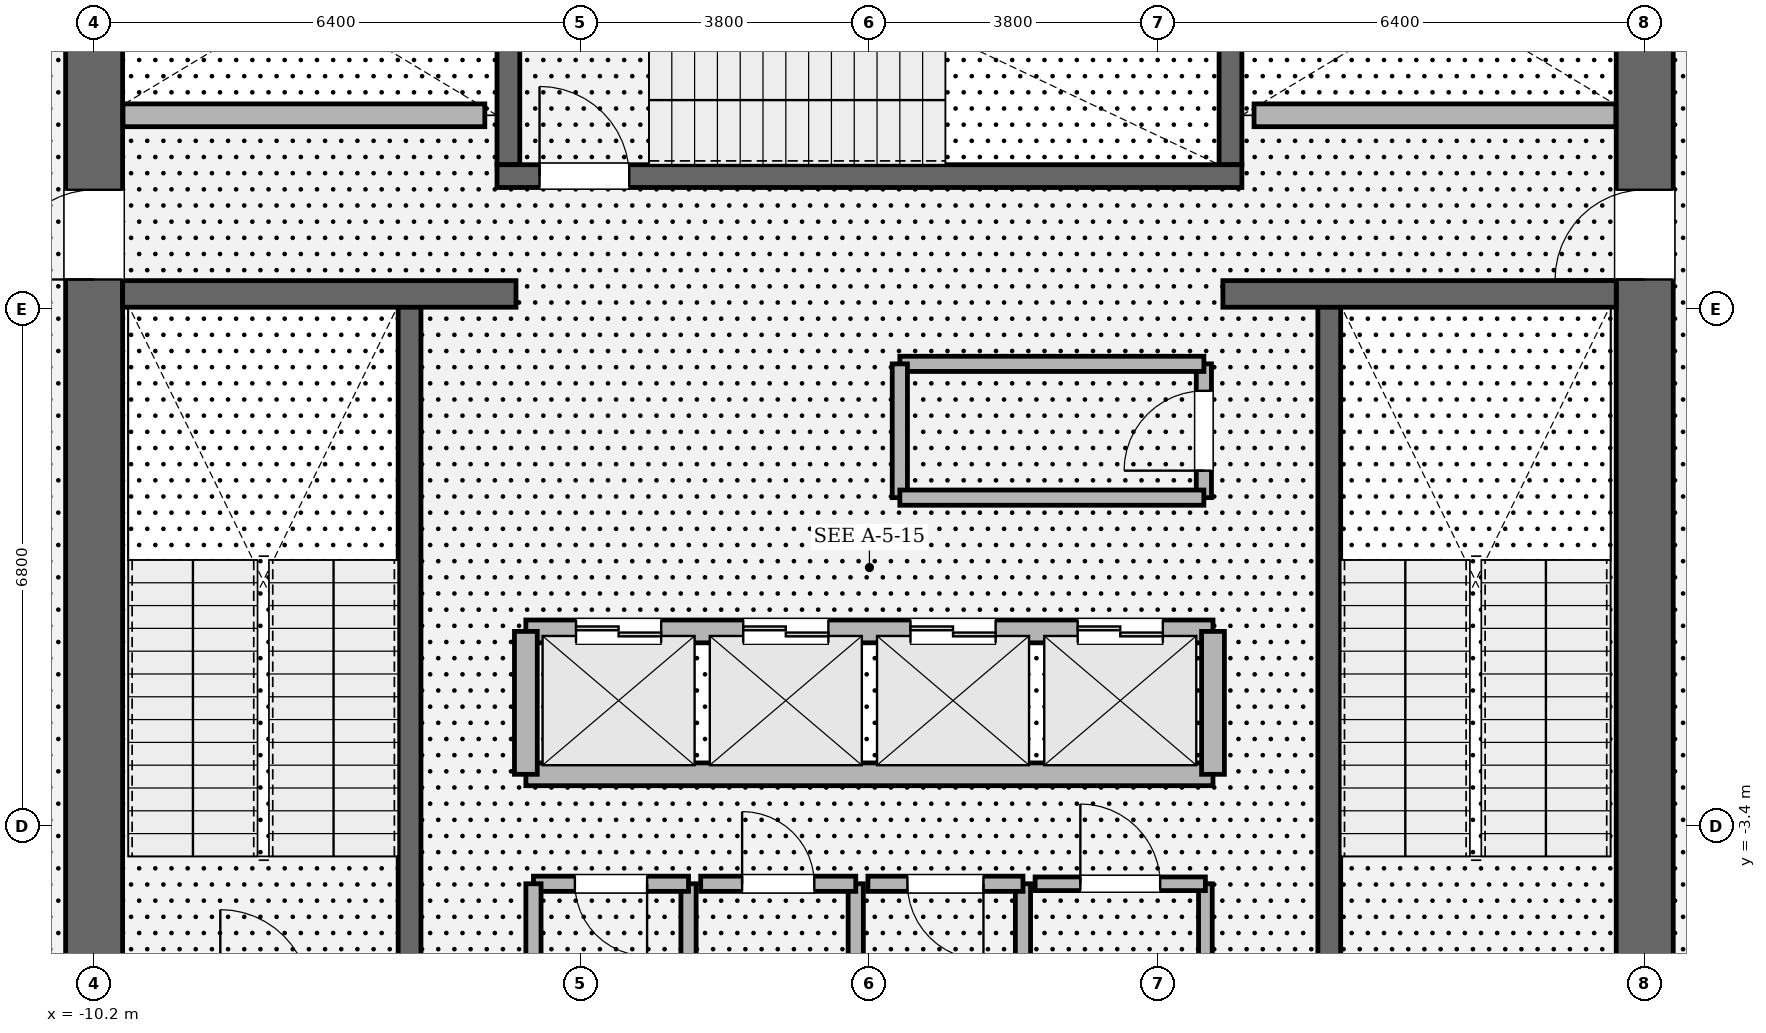
"""IFC4 building model, lengths in metres.
Left out: names, types, materials, properties, quantities, classifications, styles, units other than length and angle.
Written with IfcOpenShell. Run it as: python <this file> out.ifc"""

import sys

from ifc_helpers import new_model, si_unit, direction, frame, frame_2d, origin, place, context, subcontext, project, spatial, rectangle, extrude, element, fill, save


model = new_model("IFC4")
c1 = context("Model", 3, precision=1e-05, world=origin(), true_north=direction((0.0, 1.0)))
c2 = subcontext(c1, "Body", "Model", "MODEL_VIEW")
j1 = project(units=[si_unit("LENGTHUNIT", "METRE"), si_unit("PLANEANGLEUNIT", "RADIAN")], contexts=[c1])
p1 = place(None, origin())
s1 = spatial("IfcSite", under=j1, at=p1, CompositionType="ELEMENT")
p2 = place(p1, origin())
s2 = spatial("IfcBuilding", under=s1, at=p2, CompositionType="ELEMENT")
p3 = place(p2, frame((0.0, 0.0, 64.65)))
s3 = spatial("IfcBuildingStorey", under=s2, at=p3, CompositionType="ELEMENT", Elevation=64.65)
p4 = place(p3, frame((-10.2, -8.825, 0.0), z_axis=(0.0, 0.0, 1.0), x_axis=(0.0, 1.0, 0.0)))
e1 = element("IfcWall", 1, at=p4, inside=s3, PredefinedType="SHEAR", context=c2, shape_type="SweptSolid", body=[
    extrude(rectangle(XDim=17.65, YDim=0.75, at=frame_2d((8.825, 0.0))), origin(), (0.0, 0.0, 1.0), 4.05),
])
p5 = place(p4, frame((12.615, 0.0, 0.0)))
e2 = element("IfcOpeningElement", 2, at=p5, cuts=e1, PredefinedType="OPENING", context=c2, shape_type="SweptSolid", body=[
    extrude(rectangle(XDim=1.18, YDim=2.2, at=frame_2d((0.59, 1.1))), frame((0.0, 0.385, 0.0), z_axis=(0.0, -1.0, 0.0), x_axis=(1.0, 0.0, 0.0)), (0.0, 0.0, 1.0), 0.77),
])
p6 = place(p3, frame((10.2, 8.825, 0.0), z_axis=(0.0, 0.0, 1.0), x_axis=(0.0, -1.0, 0.0)))
e3 = element("IfcWall", 3, at=p6, inside=s3, PredefinedType="SHEAR", context=c2, shape_type="SweptSolid", body=[
    extrude(rectangle(XDim=17.65, YDim=0.75, at=frame_2d((8.825, 0.0))), origin(), (0.0, 0.0, 1.0), 4.05),
])
p7 = place(p6, frame((3.855, 0.0, 0.0)))
e4 = element("IfcOpeningElement", 4, at=p7, cuts=e3, PredefinedType="OPENING", context=c2, shape_type="SweptSolid", body=[
    extrude(rectangle(XDim=1.18, YDim=2.2, at=frame_2d((0.59, 1.1))), frame((0.0, 0.385, 0.0), z_axis=(0.0, -1.0, 0.0), x_axis=(1.0, 0.0, 0.0)), (0.0, 0.0, 1.0), 0.77),
])
for number, where, z_axis, x_axis in (
    (5, (-6.05, -5.5, 0.0), (0.0, 0.0, 1.0), (0.0, 1.0, 0.0)),
    (6, (6.05, 3.45, 0.0), (0.0, 0.0, 1.0), (0.0, -1.0, 0.0)),
):
    element("IfcWall", number, at=place(p3, frame(where, z_axis=z_axis, x_axis=x_axis)), inside=s3, PredefinedType="SOLIDWALL", context=c2, shape_type="SweptSolid", body=[
        extrude(rectangle(XDim=8.95, YDim=0.3, at=frame_2d((4.475, 0.0))), origin(), (0.0, 0.0, 1.0), 4.05),
    ])
for number, where, z_axis, x_axis in (
    (7, (-4.75, 5.3, 0.0), (0.0, 0.0, 1.0), (0.0, 1.0, 0.0)),
    (8, (4.75, 8.825, 0.0), (0.0, 0.0, 1.0), (0.0, -1.0, 0.0)),
):
    element("IfcWall", number, at=place(p3, frame(where, z_axis=z_axis, x_axis=x_axis)), inside=s3, PredefinedType="SOLIDWALL", context=c2, shape_type="SweptSolid", body=[
        extrude(rectangle(XDim=3.525, YDim=0.3, at=frame_2d((1.762, 0.0))), origin(), (0.0, 0.0, 1.0), 4.05),
    ])
p8 = place(p3, frame((-4.9, 5.15, 0.0), z_axis=(0.0, 0.0, 1.0), x_axis=(1.0, 0.0, 0.0)))
e9 = element("IfcWall", 9, at=p8, inside=s3, PredefinedType="SOLIDWALL", context=c2, shape_type="SweptSolid", body=[
    extrude(rectangle(XDim=9.8, YDim=0.3, at=frame_2d((4.9, 0.0))), origin(), (0.0, 0.0, 1.0), 4.05),
])
p9 = place(p8, frame((0.56, 0.0, 0.0)))
e10 = element("IfcOpeningElement", 10, at=p9, cuts=e9, PredefinedType="OPENING", context=c2, shape_type="SweptSolid", body=[
    extrude(rectangle(XDim=1.18, YDim=2.2, at=frame_2d((0.59, 1.1))), frame((0.0, 0.16, 0.0), z_axis=(0.0, -1.0, 0.0), x_axis=(1.0, 0.0, 0.0)), (0.0, 0.0, 1.0), 0.32),
])
for number, where, z_axis, x_axis in (
    (11, (-9.825, 3.6, 0.0), (0.0, 0.0, 1.0), (1.0, 0.0, 0.0)),
    (12, (4.65, 3.6, 0.0), (0.0, 0.0, 1.0), (1.0, 0.0, 0.0)),
):
    element("IfcWall", number, at=place(p3, frame(where, z_axis=z_axis, x_axis=x_axis)), inside=s3, PredefinedType="SOLIDWALL", context=c2, shape_type="SweptSolid", body=[
        extrude(rectangle(XDim=5.175, YDim=0.35, at=frame_2d((2.587, 0.0))), origin(), (0.0, 0.0, 1.0), 4.05),
    ])
p10 = place(p3, frame((-4.52, -0.84, 0.0), z_axis=(0.0, 0.0, 1.0), x_axis=(1.0, 0.0, 0.0)))
e13 = element("IfcWall", 13, at=p10, inside=s3, PredefinedType="SOLIDWALL", context=c2, shape_type="SweptSolid", body=[
    extrude(rectangle(XDim=9.04, YDim=0.3, at=frame_2d((4.52, 0.0))), origin(), (0.0, 0.0, 1.0), 3.81),
])
p11 = place(p10, frame((0.66, 0.0, 0.0)))
e14 = element("IfcOpeningElement", 14, at=p11, cuts=e13, PredefinedType="OPENING", context=c2, shape_type="SweptSolid", body=[
    extrude(rectangle(XDim=1.12, YDim=2.25, at=frame_2d((0.56, 1.125))), frame((0.0, 0.16, 0.0), z_axis=(0.0, -1.0, 0.0), x_axis=(1.0, 0.0, 0.0)), (0.0, 0.0, 1.0), 0.32),
])
p12 = place(p10, frame((2.86, 0.0, 0.0)))
e15 = element("IfcOpeningElement", 15, at=p12, cuts=e13, PredefinedType="OPENING", context=c2, shape_type="SweptSolid", body=[
    extrude(rectangle(XDim=1.12, YDim=2.25, at=frame_2d((0.56, 1.125))), frame((0.0, 0.16, 0.0), z_axis=(0.0, -1.0, 0.0), x_axis=(1.0, 0.0, 0.0)), (0.0, 0.0, 1.0), 0.32),
])
p13 = place(p10, frame((5.06, 0.0, 0.0)))
e16 = element("IfcOpeningElement", 16, at=p13, cuts=e13, PredefinedType="OPENING", context=c2, shape_type="SweptSolid", body=[
    extrude(rectangle(XDim=1.12, YDim=2.25, at=frame_2d((0.56, 1.125))), frame((0.0, 0.16, 0.0), z_axis=(0.0, -1.0, 0.0), x_axis=(1.0, 0.0, 0.0)), (0.0, 0.0, 1.0), 0.32),
])
p14 = place(p10, frame((7.26, 0.0, 0.0)))
e17 = element("IfcOpeningElement", 17, at=p14, cuts=e13, PredefinedType="OPENING", context=c2, shape_type="SweptSolid", body=[
    extrude(rectangle(XDim=1.12, YDim=2.25, at=frame_2d((0.56, 1.125))), frame((0.0, 0.16, 0.0), z_axis=(0.0, -1.0, 0.0), x_axis=(1.0, 0.0, 0.0)), (0.0, 0.0, 1.0), 0.32),
])
p15 = place(p3, frame((-4.52, -2.72, 0.0), z_axis=(0.0, 0.0, 1.0), x_axis=(1.0, 0.0, 0.0)))
e18 = element("IfcWall", 18, at=p15, inside=s3, PredefinedType="SOLIDWALL", context=c2, shape_type="SweptSolid", body=[
    extrude(rectangle(XDim=9.04, YDim=0.3, at=frame_2d((4.52, 0.0))), origin(), (0.0, 0.0, 1.0), 3.81),
])
for number, where, z_axis, x_axis in (
    (19, (-4.52, -2.72, 0.0), (0.0, 0.0, 1.0), (0.0, 1.0, 0.0)),
    (20, (4.52, -2.72, 0.0), (0.0, 0.0, 1.0), (0.0, 1.0, 0.0)),
):
    element("IfcWall", number, at=place(p3, frame(where, z_axis=z_axis, x_axis=x_axis)), inside=s3, PredefinedType="SOLIDWALL", context=c2, shape_type="SweptSolid", body=[
        extrude(rectangle(XDim=1.88, YDim=0.3, at=frame_2d((0.94, 0.0))), origin(), (0.0, 0.0, 1.0), 3.81),
    ])
for number, where, z_axis, x_axis in (
    (21, (-9.82, 5.95, 0.0), (0.0, 0.0, 1.0), (1.0, 0.0, 0.0)),
    (22, (5.06, 5.95, 0.0), (0.0, 0.0, 1.0), (1.0, 0.0, 0.0)),
):
    element("IfcWall", number, at=place(p3, frame(where, z_axis=z_axis, x_axis=x_axis)), inside=s3, PredefinedType="SOLIDWALL", context=c2, shape_type="SweptSolid", body=[
        extrude(rectangle(XDim=4.76, YDim=0.3, at=frame_2d((2.38, 0.0))), origin(), (0.0, 0.0, 1.0), 3.81),
    ])
p16 = place(p3, frame((-2.38, -5.9, 0.0), z_axis=(0.0, 0.0, 1.0), x_axis=(0.0, 1.0, 0.0)))
e23 = element("IfcWall", 23, at=p16, inside=s3, PredefinedType="SOLIDWALL", context=c2, shape_type="SweptSolid", body=[
    extrude(rectangle(XDim=1.74, YDim=0.2, at=frame_2d((0.87, 0.0))), origin(), (0.0, 0.0, 1.0), 3.81),
])
p17 = place(p3, frame((-2.38, -4.16, 0.0), z_axis=(0.0, 0.0, 1.0), x_axis=(-1.0, 0.0, 0.0)))
e24 = element("IfcWall", 24, at=p17, inside=s3, PredefinedType="SOLIDWALL", context=c2, shape_type="SweptSolid", body=[
    extrude(rectangle(XDim=2.04, YDim=0.2, at=frame_2d((1.02, 0.0))), origin(), (0.0, 0.0, 1.0), 3.81),
])
p18 = place(p17, frame((0.545, 0.0, 0.0)))
e25 = element("IfcOpeningElement", 25, at=p18, cuts=e24, PredefinedType="OPENING", context=c2, shape_type="SweptSolid", body=[
    extrude(rectangle(XDim=0.95, YDim=2.15, at=frame_2d((0.475, 1.075))), frame((0.0, 0.11, 0.0), z_axis=(0.0, -1.0, 0.0), x_axis=(1.0, 0.0, 0.0)), (0.0, 0.0, 1.0), 0.22),
])
for number, where, z_axis, x_axis in (
    (26, (-4.42, -4.16, 0.0), (0.0, 0.0, 1.0), (0.0, -1.0, 0.0)),
    (27, (-0.18, -5.9, 0.0), (0.0, 0.0, 1.0), (0.0, 1.0, 0.0)),
):
    element("IfcWall", number, at=place(p3, frame(where, z_axis=z_axis, x_axis=x_axis)), inside=s3, PredefinedType="SOLIDWALL", context=c2, shape_type="SweptSolid", body=[
        extrude(rectangle(XDim=1.74, YDim=0.2, at=frame_2d((0.87, 0.0))), origin(), (0.0, 0.0, 1.0), 3.81),
    ])
p19 = place(p3, frame((-0.18, -4.16, 0.0), z_axis=(0.0, 0.0, 1.0), x_axis=(-1.0, 0.0, 0.0)))
e28 = element("IfcWall", 28, at=p19, inside=s3, PredefinedType="SOLIDWALL", context=c2, shape_type="SweptSolid", body=[
    extrude(rectangle(XDim=2.04, YDim=0.2, at=frame_2d((1.02, 0.0))), origin(), (0.0, 0.0, 1.0), 3.81),
])
p20 = place(p19, frame((0.545, 0.0, 0.0)))
e29 = element("IfcOpeningElement", 29, at=p20, cuts=e28, PredefinedType="OPENING", context=c2, shape_type="SweptSolid", body=[
    extrude(rectangle(XDim=0.95, YDim=2.15, at=frame_2d((0.475, 1.075))), frame((0.0, 0.11, 0.0), z_axis=(0.0, -1.0, 0.0), x_axis=(1.0, 0.0, 0.0)), (0.0, 0.0, 1.0), 0.22),
])
p21 = place(p3, frame((2.02, -5.9, 0.0), z_axis=(0.0, 0.0, 1.0), x_axis=(0.0, 1.0, 0.0)))
e30 = element("IfcWall", 30, at=p21, inside=s3, PredefinedType="SOLIDWALL", context=c2, shape_type="SweptSolid", body=[
    extrude(rectangle(XDim=1.74, YDim=0.2, at=frame_2d((0.87, 0.0))), origin(), (0.0, 0.0, 1.0), 3.81),
])
p22 = place(p3, frame((2.02, -4.16, 0.0), z_axis=(0.0, 0.0, 1.0), x_axis=(-1.0, 0.0, 0.0)))
e31 = element("IfcWall", 31, at=p22, inside=s3, PredefinedType="SOLIDWALL", context=c2, shape_type="SweptSolid", body=[
    extrude(rectangle(XDim=2.04, YDim=0.2, at=frame_2d((1.02, 0.0))), origin(), (0.0, 0.0, 1.0), 3.81),
])
p23 = place(p22, frame((0.52, 0.0, 0.0)))
e32 = element("IfcOpeningElement", 32, at=p23, cuts=e31, PredefinedType="OPENING", context=c2, shape_type="SweptSolid", body=[
    extrude(rectangle(XDim=1.0, YDim=2.15, at=frame_2d((0.5, 1.075))), frame((0.0, 0.11, 0.0), z_axis=(0.0, -1.0, 0.0), x_axis=(1.0, 0.0, 0.0)), (0.0, 0.0, 1.0), 0.22),
])
p24 = place(p3, frame((4.42, -5.9, 0.0), z_axis=(0.0, 0.0, 1.0), x_axis=(0.0, 1.0, 0.0)))
e33 = element("IfcWall", 33, at=p24, inside=s3, PredefinedType="PARTITIONING", context=c2, shape_type="SweptSolid", body=[
    extrude(rectangle(XDim=1.74, YDim=0.18, at=frame_2d((0.87, 0.0))), origin(), (0.0, 0.0, 1.0), 3.81),
])
p25 = place(p3, frame((4.42, -4.16, 0.0), z_axis=(0.0, 0.0, 1.0), x_axis=(-1.0, 0.0, 0.0)))
e34 = element("IfcWall", 34, at=p25, inside=s3, PredefinedType="PARTITIONING", context=c2, shape_type="SweptSolid", body=[
    extrude(rectangle(XDim=2.24, YDim=0.18, at=frame_2d((1.12, 0.0))), origin(), (0.0, 0.0, 1.0), 3.81),
])
p26 = place(p25, frame((0.595, 0.0, 0.0)))
e35 = element("IfcOpeningElement", 35, at=p26, cuts=e34, PredefinedType="OPENING", context=c2, shape_type="SweptSolid", body=[
    extrude(rectangle(XDim=1.05, YDim=2.2, at=frame_2d((0.525, 1.1))), frame((0.0, 0.1, 0.0), z_axis=(0.0, -1.0, 0.0), x_axis=(1.0, 0.0, 0.0)), (0.0, 0.0, 1.0), 0.2),
])
p27 = place(p3, frame((4.4, 0.92, 0.0), z_axis=(0.0, 0.0, 1.0), x_axis=(0.0, 1.0, 0.0)))
e36 = element("IfcWall", 36, at=p27, inside=s3, PredefinedType="SOLIDWALL", context=c2, shape_type="SweptSolid", body=[
    extrude(rectangle(XDim=1.76, YDim=0.2, at=frame_2d((0.88, 0.0))), origin(), (0.0, 0.0, 1.0), 3.81),
])
p28 = place(p27, frame((0.355, 0.0, 0.0)))
e37 = element("IfcOpeningElement", 37, at=p28, cuts=e36, PredefinedType="OPENING", context=c2, shape_type="SweptSolid", body=[
    extrude(rectangle(XDim=1.05, YDim=2.2, at=frame_2d((0.525, 1.1))), frame((0.0, 0.11, 0.0), z_axis=(0.0, -1.0, 0.0), x_axis=(1.0, 0.0, 0.0)), (0.0, 0.0, 1.0), 0.22),
])
p29 = place(p3, frame((4.4, 2.68, 0.0), z_axis=(0.0, 0.0, 1.0), x_axis=(-1.0, 0.0, 0.0)))
e38 = element("IfcWall", 38, at=p29, inside=s3, PredefinedType="SOLIDWALL", context=c2, shape_type="SweptSolid", body=[
    extrude(rectangle(XDim=4.0, YDim=0.2, at=frame_2d((2.0, 0.0))), origin(), (0.0, 0.0, 1.0), 3.81),
])
p30 = place(p3, frame((0.4, 2.68, 0.0), z_axis=(0.0, 0.0, 1.0), x_axis=(0.0, -1.0, 0.0)))
e39 = element("IfcWall", 39, at=p30, inside=s3, PredefinedType="SOLIDWALL", context=c2, shape_type="SweptSolid", body=[
    extrude(rectangle(XDim=1.76, YDim=0.2, at=frame_2d((0.88, 0.0))), origin(), (0.0, 0.0, 1.0), 3.81),
])
p31 = place(p3, frame((0.4, 0.92, 0.0), z_axis=(0.0, 0.0, 1.0), x_axis=(1.0, 0.0, 0.0)))
e40 = element("IfcWall", 40, at=p31, inside=s3, PredefinedType="SOLIDWALL", context=c2, shape_type="SweptSolid", body=[
    extrude(rectangle(XDim=4.0, YDim=0.2, at=frame_2d((2.0, 0.0))), origin(), (0.0, 0.0, 1.0), 3.81),
])
p32 = place(p9, origin())
e41 = element("IfcDoor", 41, at=p32, inside=s3, OperationType="SINGLE_SWING_LEFT", PredefinedType="DOOR", context=c2, shape_type="SweptSolid", body=[
    extrude(rectangle(XDim=1.18, YDim=2.2, at=frame_2d((0.59, 1.1))), frame((0.0, 0.025, 0.0), z_axis=(0.0, -1.0, 0.0), x_axis=(1.0, 0.0, 0.0)), (0.0, 0.0, 1.0), 0.05),
])
fill(e10, e41)
p33 = place(p5, origin())
e42 = element("IfcDoor", 42, at=p33, inside=s3, OperationType="SINGLE_SWING_LEFT", PredefinedType="DOOR", context=c2, shape_type="SweptSolid", body=[
    extrude(rectangle(XDim=1.18, YDim=2.2, at=frame_2d((0.59, 1.1))), frame((0.0, 0.025, 0.0), z_axis=(0.0, -1.0, 0.0), x_axis=(1.0, 0.0, 0.0)), (0.0, 0.0, 1.0), 0.05),
])
fill(e2, e42)
p34 = place(p7, origin())
e43 = element("IfcDoor", 43, at=p34, inside=s3, OperationType="SINGLE_SWING_RIGHT", PredefinedType="DOOR", context=c2, shape_type="SweptSolid", body=[
    extrude(rectangle(XDim=1.18, YDim=2.2, at=frame_2d((0.59, 1.1))), frame((0.0, 0.025, 0.0), z_axis=(0.0, -1.0, 0.0), x_axis=(1.0, 0.0, 0.0)), (0.0, 0.0, 1.0), 0.05),
])
fill(e4, e43)
p35 = place(p11, origin())
e44 = element("IfcDoor", 44, at=p35, inside=s3, OperationType="DOUBLE_DOOR_SLIDING", PredefinedType="DOOR", context=c2, shape_type="SweptSolid", body=[
    extrude(rectangle(XDim=1.12, YDim=2.25, at=frame_2d((0.56, 1.125))), frame((0.0, 0.025, 0.0), z_axis=(0.0, -1.0, 0.0), x_axis=(1.0, 0.0, 0.0)), (0.0, 0.0, 1.0), 0.05),
])
fill(e14, e44)
p36 = place(p12, origin())
e45 = element("IfcDoor", 45, at=p36, inside=s3, OperationType="DOUBLE_DOOR_SLIDING", PredefinedType="DOOR", context=c2, shape_type="SweptSolid", body=[
    extrude(rectangle(XDim=1.12, YDim=2.25, at=frame_2d((0.56, 1.125))), frame((0.0, 0.025, 0.0), z_axis=(0.0, -1.0, 0.0), x_axis=(1.0, 0.0, 0.0)), (0.0, 0.0, 1.0), 0.05),
])
fill(e15, e45)
p37 = place(p13, origin())
e46 = element("IfcDoor", 46, at=p37, inside=s3, OperationType="DOUBLE_DOOR_SLIDING", PredefinedType="DOOR", context=c2, shape_type="SweptSolid", body=[
    extrude(rectangle(XDim=1.12, YDim=2.25, at=frame_2d((0.56, 1.125))), frame((0.0, 0.025, 0.0), z_axis=(0.0, -1.0, 0.0), x_axis=(1.0, 0.0, 0.0)), (0.0, 0.0, 1.0), 0.05),
])
fill(e16, e46)
p38 = place(p14, origin())
e47 = element("IfcDoor", 47, at=p38, inside=s3, OperationType="DOUBLE_DOOR_SLIDING", PredefinedType="DOOR", context=c2, shape_type="SweptSolid", body=[
    extrude(rectangle(XDim=1.12, YDim=2.25, at=frame_2d((0.56, 1.125))), frame((0.0, 0.025, 0.0), z_axis=(0.0, -1.0, 0.0), x_axis=(1.0, 0.0, 0.0)), (0.0, 0.0, 1.0), 0.05),
])
fill(e17, e47)
p39 = place(p18, origin())
e48 = element("IfcDoor", 48, at=p39, inside=s3, OperationType="SINGLE_SWING_LEFT", PredefinedType="DOOR", context=c2, shape_type="SweptSolid", body=[
    extrude(rectangle(XDim=0.95, YDim=2.15, at=frame_2d((0.475, 1.075))), frame((0.0, 0.025, 0.0), z_axis=(0.0, -1.0, 0.0), x_axis=(1.0, 0.0, 0.0)), (0.0, 0.0, 1.0), 0.05),
])
fill(e25, e48)
p40 = place(p20, origin())
e49 = element("IfcDoor", 49, at=p40, inside=s3, OperationType="SINGLE_SWING_RIGHT", PredefinedType="DOOR", context=c2, shape_type="SweptSolid", body=[
    extrude(rectangle(XDim=0.95, YDim=2.15, at=frame_2d((0.475, 1.075))), frame((0.0, 0.025, 0.0), z_axis=(0.0, -1.0, 0.0), x_axis=(1.0, 0.0, 0.0)), (0.0, 0.0, 1.0), 0.05),
])
fill(e29, e49)
p41 = place(p23, origin())
e50 = element("IfcDoor", 50, at=p41, inside=s3, OperationType="SINGLE_SWING_LEFT", PredefinedType="DOOR", context=c2, shape_type="SweptSolid", body=[
    extrude(rectangle(XDim=1.0, YDim=2.15, at=frame_2d((0.5, 1.075))), frame((0.0, 0.025, 0.0), z_axis=(0.0, -1.0, 0.0), x_axis=(1.0, 0.0, 0.0)), (0.0, 0.0, 1.0), 0.05),
])
fill(e32, e50)
p42 = place(p26, origin())
e51 = element("IfcDoor", 51, at=p42, inside=s3, OperationType="SINGLE_SWING_RIGHT", PredefinedType="DOOR", context=c2, shape_type="SweptSolid", body=[
    extrude(rectangle(XDim=1.05, YDim=2.2, at=frame_2d((0.525, 1.1))), frame((0.0, 0.025, 0.0), z_axis=(0.0, -1.0, 0.0), x_axis=(1.0, 0.0, 0.0)), (0.0, 0.0, 1.0), 0.05),
])
fill(e35, e51)
p43 = place(p28, origin())
e52 = element("IfcDoor", 52, at=p43, inside=s3, OperationType="SINGLE_SWING_LEFT", PredefinedType="DOOR", context=c2, shape_type="SweptSolid", body=[
    extrude(rectangle(XDim=1.05, YDim=2.2, at=frame_2d((0.525, 1.1))), frame((0.0, 0.025, 0.0), z_axis=(0.0, -1.0, 0.0), x_axis=(1.0, 0.0, 0.0)), (0.0, 0.0, 1.0), 0.05),
])
fill(e37, e52)
save(model, sys.argv[1])
